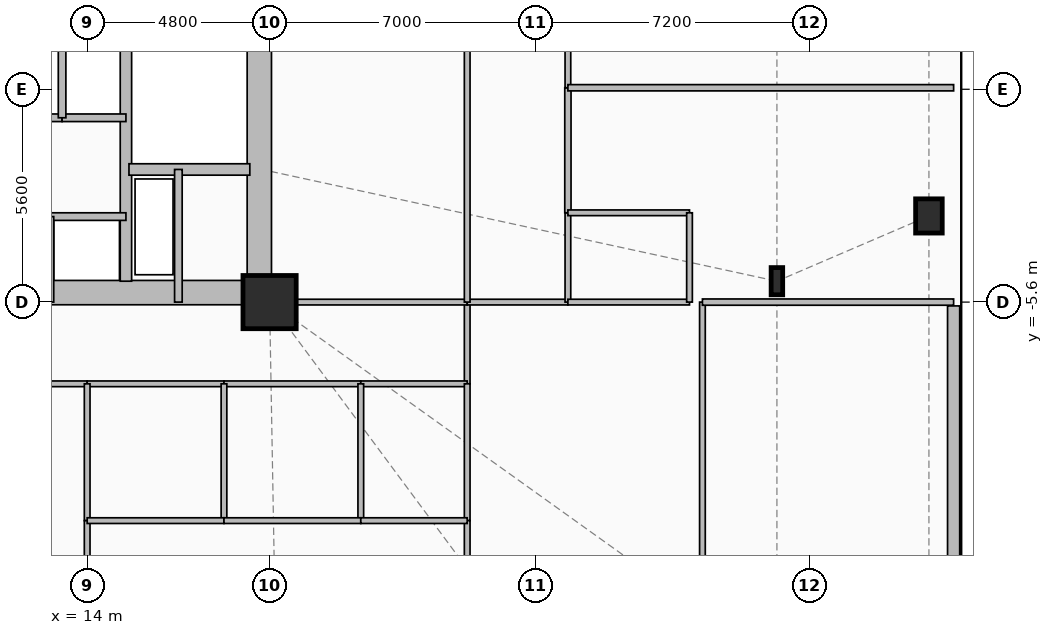
"""IFC4 building model, lengths in metres.
Left out: names, types, materials, properties, quantities, classifications, styles, units other than length and angle.
Written with IfcOpenShell. Run it as: python <this file> out.ifc"""

import sys

from ifc_helpers import new_model, si_unit, direction, frame, frame_2d, origin, origin_2d, place, context, subcontext, project, spatial, rectangle, i_section, extrude, element, fill, save


model = new_model("IFC4")
c1 = context("Model", 3, precision=1e-05, world=origin(), true_north=direction((0.0, 1.0)))
c2 = subcontext(c1, "Body", "Model", "MODEL_VIEW")
j1 = project(units=[si_unit("LENGTHUNIT", "METRE"), si_unit("PLANEANGLEUNIT", "RADIAN")], contexts=[c1])
p1 = place(None, origin())
s1 = spatial("IfcSite", under=j1, at=p1, CompositionType="ELEMENT")
p2 = place(p1, origin())
s2 = spatial("IfcBuilding", under=s1, at=p2, CompositionType="ELEMENT")
p3 = place(p2, frame((0.0, 0.0, 22.5)))
s3 = spatial("IfcBuildingStorey", under=s2, at=p3, CompositionType="ELEMENT", Elevation=22.5)
p4 = place(p3, frame((18.8, -5.6, 0.0), z_axis=(0.0, 0.0, 1.0), x_axis=(1.0, 0.0, 0.0)))
e1 = element("IfcColumn", 1, at=p4, inside=s3, PredefinedType="COLUMN", context=c2, shape_type="SweptSolid", body=[
    extrude(rectangle(XDim=1.4, YDim=1.4, at=origin_2d()), origin(), (0.0, 0.0, 1.0), 4.5),
])
p5 = place(p3, frame((36.15, -3.333, 0.0), z_axis=(0.0, 0.0, 1.0), x_axis=(1.0, 0.0, 0.0)))
e2 = element("IfcColumn", 2, at=p5, inside=s3, PredefinedType="COLUMN", context=c2, shape_type="SweptSolid", body=[
    extrude(rectangle(XDim=0.7, YDim=0.9, at=origin_2d()), origin(), (0.0, 0.0, 1.0), 4.5),
])
p6 = place(p3, frame((32.15, -5.05, 0.0), z_axis=(0.0, 0.0, 1.0), x_axis=(1.0, 0.0, 0.0)))
e3 = element("IfcColumn", 3, at=p6, inside=s3, PredefinedType="COLUMN", context=c2, shape_type="SweptSolid", body=[
    extrude(i_section(OverallWidth=0.304, OverallDepth=0.716, WebThickness=0.021, FlangeThickness=0.04, FilletRadius=0.027, at=origin_2d()), origin(), (0.0, 0.0, 1.0), 4.5),
])
p7 = place(p3, frame((36.8, -5.7, 0.0), z_axis=(0.0, 0.0, 1.0), x_axis=(0.0, -1.0, 0.0)))
e4 = element("IfcWall", 4, at=p7, inside=s3, PredefinedType="SOLIDWALL", context=c2, shape_type="SweptSolid", body=[
    extrude(rectangle(XDim=16.1, YDim=0.32, at=frame_2d((8.05, 0.0))), origin(), (0.0, 0.0, 1.0), 4.16),
])
p8 = place(p7, frame((8.485, 0.0, 0.85)))
e5 = element("IfcOpeningElement", 5, at=p8, cuts=e4, PredefinedType="OPENING", context=c2, shape_type="SweptSolid", body=[
    extrude(rectangle(XDim=2.6, YDim=2.4, at=frame_2d((1.3, 1.2))), frame((0.0, 0.17, 0.0), z_axis=(0.0, -1.0, 0.0), x_axis=(1.0, 0.0, 0.0)), (0.0, 0.0, 1.0), 0.34),
])
p9 = place(p3, frame((9.2, -5.35, 0.0), z_axis=(0.0, 0.0, 1.0), x_axis=(1.0, 0.0, 0.0)))
e6 = element("IfcWall", 6, at=p9, inside=s3, PredefinedType="SHEAR", context=c2, shape_type="SweptSolid", body=[
    extrude(rectangle(XDim=9.6, YDim=0.64, at=frame_2d((4.8, 0.0))), origin(), (0.0, 0.0, 1.0), 4.16),
])
p10 = place(p9, frame((7.65, 0.0, 0.0)))
e7 = element("IfcOpeningElement", 7, at=p10, cuts=e6, PredefinedType="OPENING", context=c2, shape_type="SweptSolid", body=[
    extrude(rectangle(XDim=0.9, YDim=2.1, at=frame_2d((0.45, 1.05))), frame((0.0, 0.33, 0.0), z_axis=(0.0, -1.0, 0.0), x_axis=(1.0, 0.0, 0.0)), (0.0, 0.0, 1.0), 0.66),
])
p11 = place(p3, frame((18.53, -5.05, 0.0), z_axis=(0.0, 0.0, 1.0), x_axis=(0.0, 1.0, 0.0)))
e8 = element("IfcWall", 8, at=p11, inside=s3, PredefinedType="SHEAR", context=c2, shape_type="SweptSolid", body=[
    extrude(rectangle(XDim=10.1, YDim=0.64, at=frame_2d((5.05, 0.0))), origin(), (0.0, 0.0, 1.0), 4.16),
])
p12 = place(p3, frame((15.02, -5.05, 0.0), z_axis=(0.0, 0.0, 1.0), x_axis=(0.0, 1.0, 0.0)))
e9 = element("IfcWall", 9, at=p12, inside=s3, PredefinedType="SHEAR", context=c2, shape_type="SweptSolid", body=[
    extrude(rectangle(XDim=10.1, YDim=0.3, at=frame_2d((5.05, 0.0))), origin(), (0.0, 0.0, 1.0), 4.16),
])
p13 = place(p3, frame((15.1, -2.11, 0.0), z_axis=(0.0, 0.0, 1.0), x_axis=(1.0, 0.0, 0.0)))
e10 = element("IfcWall", 10, at=p13, inside=s3, PredefinedType="SHEAR", context=c2, shape_type="SweptSolid", body=[
    extrude(rectangle(XDim=3.18, YDim=0.3, at=frame_2d((1.59, 0.0))), origin(), (0.0, 0.0, 1.0), 4.16),
])
p14 = place(p3, frame((16.4, -2.11, 0.0), z_axis=(0.0, 0.0, 1.0), x_axis=(0.0, -1.0, 0.0)))
e11 = element("IfcWall", 11, at=p14, inside=s3, PredefinedType="PARTITIONING", context=c2, shape_type="SweptSolid", body=[
    extrude(rectangle(XDim=3.49, YDim=0.2, at=frame_2d((1.745, 0.0))), origin(), (0.0, 0.0, 1.0), 4.16),
])
p15 = place(p3, frame((13.02, -3.35, 0.0), z_axis=(0.0, 0.0, 1.0), x_axis=(1.0, 0.0, 0.0)))
e12 = element("IfcWall", 12, at=p15, inside=s3, PredefinedType="PARTITIONING", context=c2, shape_type="SweptSolid", body=[
    extrude(rectangle(XDim=2.0, YDim=0.2, at=frame_2d((1.0, 0.0))), origin(), (0.0, 0.0, 1.0), 4.16),
])
p16 = place(p3, frame((13.34, -0.75, 0.0), z_axis=(0.0, 0.0, 1.0), x_axis=(-1.0, 0.0, 0.0)))
e13 = element("IfcWall", 13, at=p16, inside=s3, PredefinedType="PARTITIONING", context=c2, shape_type="SweptSolid", body=[
    extrude(rectangle(XDim=1.88, YDim=0.2, at=frame_2d((0.94, 0.0))), origin(), (0.0, 0.0, 1.0), 4.16),
])
p17 = place(p16, frame((0.415, 0.0, 0.0)))
e14 = element("IfcOpeningElement", 14, at=p17, cuts=e13, PredefinedType="OPENING", context=c2, shape_type="SweptSolid", body=[
    extrude(rectangle(XDim=1.05, YDim=2.1, at=frame_2d((0.525, 1.05))), frame((0.0, 0.11, 0.0), z_axis=(0.0, -1.0, 0.0), x_axis=(1.0, 0.0, 0.0)), (0.0, 0.0, 1.0), 0.22),
])
p18 = place(p3, frame((15.02, -0.75, 0.0), z_axis=(0.0, 0.0, 1.0), x_axis=(-1.0, 0.0, 0.0)))
e15 = element("IfcWall", 15, at=p18, inside=s3, PredefinedType="PARTITIONING", context=c2, shape_type="SweptSolid", body=[
    extrude(rectangle(XDim=1.68, YDim=0.2, at=frame_2d((0.84, 0.0))), origin(), (0.0, 0.0, 1.0), 4.16),
])
p19 = place(p3, frame((13.02, -5.6, 0.0), z_axis=(0.0, 0.0, 1.0), x_axis=(0.0, 1.0, 0.0)))
e16 = element("IfcWall", 16, at=p19, inside=s3, PredefinedType="PARTITIONING", context=c2, shape_type="SweptSolid", body=[
    extrude(rectangle(XDim=2.25, YDim=0.2, at=frame_2d((1.125, 0.0))), origin(), (0.0, 0.0, 1.0), 4.16),
])
p20 = place(p3, frame((13.34, -0.75, 0.0), z_axis=(0.0, 0.0, 1.0), x_axis=(0.0, 1.0, 0.0)))
e17 = element("IfcWall", 17, at=p20, inside=s3, PredefinedType="PARTITIONING", context=c2, shape_type="SweptSolid", body=[
    extrude(rectangle(XDim=2.3, YDim=0.2, at=frame_2d((1.15, 0.0))), origin(), (0.0, 0.0, 1.0), 4.16),
])
p21 = place(p3, frame((24.0, -5.6, 0.0), z_axis=(0.0, 0.0, 1.0), x_axis=(0.0, -1.0, 0.0)))
e18 = element("IfcWall", 18, at=p21, inside=s3, PredefinedType="PARTITIONING", context=c2, shape_type="SweptSolid", body=[
    extrude(rectangle(XDim=2.15, YDim=0.15, at=frame_2d((1.075, 0.0))), origin(), (0.0, 0.0, 1.0), 4.16),
])
p22 = place(p21, frame((0.625, 0.0, 0.0)))
e19 = element("IfcOpeningElement", 19, at=p22, cuts=e18, PredefinedType="OPENING", context=c2, shape_type="SweptSolid", body=[
    extrude(rectangle(XDim=0.9, YDim=2.1, at=frame_2d((0.45, 1.05))), frame((0.0, 0.085, 0.0), z_axis=(0.0, -1.0, 0.0), x_axis=(1.0, 0.0, 0.0)), (0.0, 0.0, 1.0), 0.17),
])
p23 = place(p3, frame((18.8, -5.6, 0.0), z_axis=(0.0, 0.0, 1.0), x_axis=(1.0, 0.0, 0.0)))
e20 = element("IfcWall", 20, at=p23, inside=s3, PredefinedType="PARTITIONING", context=c2, shape_type="SweptSolid", body=[
    extrude(rectangle(XDim=5.2, YDim=0.15, at=frame_2d((2.6, 0.0))), origin(), (0.0, 0.0, 1.0), 4.16),
])
p24 = place(p3, frame((14.0, -7.75, 0.0), z_axis=(0.0, 0.0, 1.0), x_axis=(-1.0, 0.0, 0.0)))
e21 = element("IfcWall", 21, at=p24, inside=s3, PredefinedType="PARTITIONING", context=c2, shape_type="SweptSolid", body=[
    extrude(rectangle(XDim=14.0, YDim=0.15, at=frame_2d((7.0, 0.0))), origin(), (0.0, 0.0, 1.0), 4.16),
])
p25 = place(p24, frame((10.59, 0.0, 0.0)))
e22 = element("IfcOpeningElement", 22, at=p25, cuts=e21, PredefinedType="OPENING", context=c2, shape_type="SweptSolid", body=[
    extrude(rectangle(XDim=1.4, YDim=2.3, at=frame_2d((0.7, 1.15))), frame((0.0, 0.085, 0.0), z_axis=(0.0, -1.0, 0.0), x_axis=(1.0, 0.0, 0.0)), (0.0, 0.0, 1.0), 0.17),
])
p26 = place(p3, frame((17.6, -7.75, 0.0), z_axis=(0.0, 0.0, 1.0), x_axis=(-1.0, 0.0, 0.0)))
e23 = element("IfcWall", 23, at=p26, inside=s3, PredefinedType="PLUMBINGWALL", context=c2, shape_type="SweptSolid", body=[
    extrude(rectangle(XDim=3.6, YDim=0.15, at=frame_2d((1.8, 0.0))), origin(), (0.0, 0.0, 1.0), 4.16),
])
p27 = place(p26, frame((1.927, 0.0, 0.0)))
e24 = element("IfcOpeningElement", 24, at=p27, cuts=e23, PredefinedType="OPENING", context=c2, shape_type="SweptSolid", body=[
    extrude(rectangle(XDim=0.9, YDim=2.1, at=frame_2d((0.45, 1.05))), frame((0.0, 0.085, 0.0), z_axis=(0.0, -1.0, 0.0), x_axis=(1.0, 0.0, 0.0)), (0.0, 0.0, 1.0), 0.17),
])
p28 = place(p3, frame((21.2, -7.75, 0.0), z_axis=(0.0, 0.0, 1.0), x_axis=(-1.0, 0.0, 0.0)))
e25 = element("IfcWall", 25, at=p28, inside=s3, PredefinedType="PLUMBINGWALL", context=c2, shape_type="SweptSolid", body=[
    extrude(rectangle(XDim=3.6, YDim=0.15, at=frame_2d((1.8, 0.0))), origin(), (0.0, 0.0, 1.0), 4.16),
])
p29 = place(p28, frame((0.772, 0.0, 0.0)))
e26 = element("IfcOpeningElement", 26, at=p29, cuts=e25, PredefinedType="OPENING", context=c2, shape_type="SweptSolid", body=[
    extrude(rectangle(XDim=0.9, YDim=2.1, at=frame_2d((0.45, 1.05))), frame((0.0, 0.085, 0.0), z_axis=(0.0, -1.0, 0.0), x_axis=(1.0, 0.0, 0.0)), (0.0, 0.0, 1.0), 0.17),
])
p30 = place(p3, frame((24.0, -7.75, 0.0), z_axis=(0.0, 0.0, 1.0), x_axis=(-1.0, 0.0, 0.0)))
e27 = element("IfcWall", 27, at=p30, inside=s3, PredefinedType="PARTITIONING", context=c2, shape_type="SweptSolid", body=[
    extrude(rectangle(XDim=2.8, YDim=0.15, at=frame_2d((1.4, 0.0))), origin(), (0.0, 0.0, 1.0), 4.16),
])
p31 = place(p30, frame((0.666, 0.0, 0.0)))
e28 = element("IfcOpeningElement", 28, at=p31, cuts=e27, PredefinedType="OPENING", context=c2, shape_type="SweptSolid", body=[
    extrude(rectangle(XDim=0.95, YDim=2.1, at=frame_2d((0.475, 1.05))), frame((0.0, 0.085, 0.0), z_axis=(0.0, -1.0, 0.0), x_axis=(1.0, 0.0, 0.0)), (0.0, 0.0, 1.0), 0.17),
])
p32 = place(p3, frame((26.65, -5.6, 0.0), z_axis=(0.0, 0.0, 1.0), x_axis=(-1.0, 0.0, 0.0)))
e29 = element("IfcWall", 29, at=p32, inside=s3, PredefinedType="PARTITIONING", context=c2, shape_type="SweptSolid", body=[
    extrude(rectangle(XDim=2.65, YDim=0.15, at=frame_2d((1.325, 0.0))), origin(), (0.0, 0.0, 1.0), 4.16),
])
p33 = place(p32, frame((0.635, 0.0, 0.0)))
e30 = element("IfcOpeningElement", 30, at=p33, cuts=e29, PredefinedType="OPENING", context=c2, shape_type="SweptSolid", body=[
    extrude(rectangle(XDim=1.05, YDim=2.15, at=frame_2d((0.525, 1.075))), frame((0.0, 0.085, 0.0), z_axis=(0.0, -1.0, 0.0), x_axis=(1.0, 0.0, 0.0)), (0.0, 0.0, 1.0), 0.17),
])
p34 = place(p3, frame((26.65, -3.25, 0.0), z_axis=(0.0, 0.0, 1.0), x_axis=(0.0, -1.0, 0.0)))
e31 = element("IfcWall", 31, at=p34, inside=s3, PredefinedType="PLUMBINGWALL", context=c2, shape_type="SweptSolid", body=[
    extrude(rectangle(XDim=2.35, YDim=0.15, at=frame_2d((1.175, 0.0))), origin(), (0.0, 0.0, 1.0), 4.16),
])
p35 = place(p34, frame((0.616, 0.0, 0.0)))
e32 = element("IfcOpeningElement", 32, at=p35, cuts=e31, PredefinedType="OPENING", context=c2, shape_type="SweptSolid", body=[
    extrude(rectangle(XDim=0.9, YDim=2.1, at=frame_2d((0.45, 1.05))), frame((0.0, 0.085, 0.0), z_axis=(0.0, -1.0, 0.0), x_axis=(1.0, 0.0, 0.0)), (0.0, 0.0, 1.0), 0.17),
])
p36 = place(p3, frame((26.65, 0.04, 0.0), z_axis=(0.0, 0.0, 1.0), x_axis=(0.0, -1.0, 0.0)))
e33 = element("IfcWall", 33, at=p36, inside=s3, PredefinedType="PARTITIONING", context=c2, shape_type="SweptSolid", body=[
    extrude(rectangle(XDim=3.29, YDim=0.165, at=frame_2d((1.645, 0.0))), origin(), (0.0, 0.0, 1.0), 4.16),
])
p37 = place(p36, frame((0.702, 0.0, 0.0)))
e34 = element("IfcOpeningElement", 34, at=p37, cuts=e33, PredefinedType="OPENING", context=c2, shape_type="SweptSolid", body=[
    extrude(rectangle(XDim=1.15, YDim=2.15, at=frame_2d((0.575, 1.075))), frame((0.0, 0.093, 0.0), z_axis=(0.0, -1.0, 0.0), x_axis=(1.0, 0.0, 0.0)), (0.0, 0.0, 1.0), 0.185),
])
p38 = place(p3, frame((26.65, 2.155, 0.0), z_axis=(0.0, 0.0, 1.0), x_axis=(0.0, -1.0, 0.0)))
e35 = element("IfcWall", 35, at=p38, inside=s3, PredefinedType="PARTITIONING", context=c2, shape_type="SweptSolid", body=[
    extrude(rectangle(XDim=2.115, YDim=0.15, at=frame_2d((1.058, 0.0))), origin(), (0.0, 0.0, 1.0), 4.16),
])
p39 = place(p38, frame((0.583, 0.0, 0.0)))
e36 = element("IfcOpeningElement", 36, at=p39, cuts=e35, PredefinedType="OPENING", context=c2, shape_type="SweptSolid", body=[
    extrude(rectangle(XDim=0.95, YDim=2.1, at=frame_2d((0.475, 1.05))), frame((0.0, 0.085, 0.0), z_axis=(0.0, -1.0, 0.0), x_axis=(1.0, 0.0, 0.0)), (0.0, 0.0, 1.0), 0.17),
])
p40 = place(p3, frame((24.0, -5.6, 0.0), z_axis=(0.0, 0.0, 1.0), x_axis=(0.0, 1.0, 0.0)))
e37 = element("IfcWall", 37, at=p40, inside=s3, PredefinedType="PARTITIONING", context=c2, shape_type="SweptSolid", body=[
    extrude(rectangle(XDim=14.1, YDim=0.15, at=frame_2d((7.05, 0.0))), origin(), (0.0, 0.0, 1.0), 4.16),
])
p41 = place(p3, frame((30.19, -5.6, 0.0), z_axis=(0.0, 0.0, 1.0), x_axis=(0.0, -1.0, 0.0)))
e38 = element("IfcWall", 38, at=p41, inside=s3, PredefinedType="PARTITIONING", context=c2, shape_type="SweptSolid", body=[
    extrude(rectangle(XDim=16.2, YDim=0.15, at=frame_2d((8.1, 0.0))), origin(), (0.0, 0.0, 1.0), 4.16),
])
p42 = place(p41, frame((4.077, 0.0, 0.0)))
e39 = element("IfcOpeningElement", 39, at=p42, cuts=e38, PredefinedType="OPENING", context=c2, shape_type="SweptSolid", body=[
    extrude(rectangle(XDim=1.05, YDim=2.15, at=frame_2d((0.525, 1.075))), frame((0.0, 0.085, 0.0), z_axis=(0.0, -1.0, 0.0), x_axis=(1.0, 0.0, 0.0)), (0.0, 0.0, 1.0), 0.17),
])
p43 = place(p3, frame((26.65, -5.6, 0.0), z_axis=(0.0, 0.0, 1.0), x_axis=(1.0, 0.0, 0.0)))
e40 = element("IfcWall", 40, at=p43, inside=s3, PredefinedType="PLUMBINGWALL", context=c2, shape_type="SweptSolid", body=[
    extrude(rectangle(XDim=3.2, YDim=0.15, at=frame_2d((1.6, 0.0))), origin(), (0.0, 0.0, 1.0), 4.16),
])
p44 = place(p3, frame((24.0, -11.35, 0.0), z_axis=(0.0, 0.0, 1.0), x_axis=(0.0, 1.0, 0.0)))
e41 = element("IfcWall", 41, at=p44, inside=s3, PredefinedType="PARTITIONING", context=c2, shape_type="SweptSolid", body=[
    extrude(rectangle(XDim=3.6, YDim=0.15, at=frame_2d((1.8, 0.0))), origin(), (0.0, 0.0, 1.0), 4.16),
])
p45 = place(p3, frame((24.0, -21.8, 0.0), z_axis=(0.0, 0.0, 1.0), x_axis=(0.0, 1.0, 0.0)))
e42 = element("IfcWall", 42, at=p45, inside=s3, PredefinedType="PARTITIONING", context=c2, shape_type="SweptSolid", body=[
    extrude(rectangle(XDim=10.45, YDim=0.15, at=frame_2d((5.225, 0.0))), origin(), (0.0, 0.0, 1.0), 4.16),
])
p46 = place(p3, frame((30.19, -5.6, 0.0), z_axis=(0.0, 0.0, 1.0), x_axis=(1.0, 0.0, 0.0)))
e43 = element("IfcWall", 43, at=p46, inside=s3, PredefinedType="PARTITIONING", context=c2, shape_type="SweptSolid", body=[
    extrude(rectangle(XDim=6.61, YDim=0.165, at=frame_2d((3.305, 0.0))), origin(), (0.0, 0.0, 1.0), 4.16),
])
p47 = place(p3, frame((26.65, -3.25, 0.0), z_axis=(0.0, 0.0, 1.0), x_axis=(1.0, 0.0, 0.0)))
e44 = element("IfcWall", 44, at=p47, inside=s3, PredefinedType="PLUMBINGWALL", context=c2, shape_type="SweptSolid", body=[
    extrude(rectangle(XDim=3.2, YDim=0.15, at=frame_2d((1.6, 0.0))), origin(), (0.0, 0.0, 1.0), 4.16),
])
p48 = place(p3, frame((29.85, -3.25, 0.0), z_axis=(0.0, 0.0, 1.0), x_axis=(0.0, -1.0, 0.0)))
e45 = element("IfcWall", 45, at=p48, inside=s3, PredefinedType="PLUMBINGWALL", context=c2, shape_type="SweptSolid", body=[
    extrude(rectangle(XDim=2.35, YDim=0.15, at=frame_2d((1.175, 0.0))), origin(), (0.0, 0.0, 1.0), 4.16),
])
p49 = place(p3, frame((26.65, 0.04, 0.0), z_axis=(0.0, 0.0, 1.0), x_axis=(1.0, 0.0, 0.0)))
e46 = element("IfcWall", 46, at=p49, inside=s3, PredefinedType="PARTITIONING", context=c2, shape_type="SweptSolid", body=[
    extrude(rectangle(XDim=10.15, YDim=0.165, at=frame_2d((5.075, 0.0))), origin(), (0.0, 0.0, 1.0), 4.16),
])
p50 = place(p3, frame((14.0, -7.75, 0.0), z_axis=(0.0, 0.0, 1.0), x_axis=(0.0, -1.0, 0.0)))
e47 = element("IfcWall", 47, at=p50, inside=s3, PredefinedType="PLUMBINGWALL", context=c2, shape_type="SweptSolid", body=[
    extrude(rectangle(XDim=3.6, YDim=0.15, at=frame_2d((1.8, 0.0))), origin(), (0.0, 0.0, 1.0), 4.16),
])
p51 = place(p3, frame((14.0, -11.35, 0.0), z_axis=(0.0, 0.0, 1.0), x_axis=(0.0, -1.0, 0.0)))
e48 = element("IfcWall", 48, at=p51, inside=s3, PredefinedType="PARTITIONING", context=c2, shape_type="SweptSolid", body=[
    extrude(rectangle(XDim=10.45, YDim=0.15, at=frame_2d((5.225, 0.0))), origin(), (0.0, 0.0, 1.0), 4.16),
])
for number, where, z_axis, x_axis in (
    (49, (17.6, -7.75, 0.0), (0.0, 0.0, 1.0), (0.0, -1.0, 0.0)),
    (50, (17.6, -11.35, 0.0), (0.0, 0.0, 1.0), (-1.0, 0.0, 0.0)),
    (51, (21.2, -7.75, 0.0), (0.0, 0.0, 1.0), (0.0, -1.0, 0.0)),
):
    element("IfcWall", number, at=place(p3, frame(where, z_axis=z_axis, x_axis=x_axis)), inside=s3, PredefinedType="PLUMBINGWALL", context=c2, shape_type="SweptSolid", body=[
        extrude(rectangle(XDim=3.6, YDim=0.15, at=frame_2d((1.8, 0.0))), origin(), (0.0, 0.0, 1.0), 4.16),
    ])
p52 = place(p3, frame((21.2, -11.35, 0.0), z_axis=(0.0, 0.0, 1.0), x_axis=(-1.0, 0.0, 0.0)))
e52 = element("IfcWall", 52, at=p52, inside=s3, PredefinedType="PLUMBINGWALL", context=c2, shape_type="SweptSolid", body=[
    extrude(rectangle(XDim=3.6, YDim=0.15, at=frame_2d((1.8, 0.0))), origin(), (0.0, 0.0, 1.0), 4.16),
])
p53 = place(p3, frame((24.0, -11.35, 0.0), z_axis=(0.0, 0.0, 1.0), x_axis=(-1.0, 0.0, 0.0)))
e53 = element("IfcWall", 53, at=p53, inside=s3, PredefinedType="PARTITIONING", context=c2, shape_type="SweptSolid", body=[
    extrude(rectangle(XDim=2.8, YDim=0.15, at=frame_2d((1.4, 0.0))), origin(), (0.0, 0.0, 1.0), 4.16),
])
p54 = place(p53, frame((0.666, 0.0, 0.0)))
e54 = element("IfcOpeningElement", 54, at=p54, cuts=e53, PredefinedType="OPENING", context=c2, shape_type="SweptSolid", body=[
    extrude(rectangle(XDim=0.95, YDim=2.1, at=frame_2d((0.475, 1.05))), frame((0.0, 0.085, 0.0), z_axis=(0.0, -1.0, 0.0), x_axis=(1.0, 0.0, 0.0)), (0.0, 0.0, 1.0), 0.17),
])
p55 = place(p10, origin())
e55 = element("IfcDoor", 55, at=p55, inside=s3, OperationType="SINGLE_SWING_RIGHT", PredefinedType="DOOR", context=c2, shape_type="SweptSolid", body=[
    extrude(rectangle(XDim=0.9, YDim=2.1, at=frame_2d((0.45, 1.05))), frame((0.0, 0.025, 0.0), z_axis=(0.0, -1.0, 0.0), x_axis=(1.0, 0.0, 0.0)), (0.0, 0.0, 1.0), 0.05),
])
fill(e7, e55)
p56 = place(p22, origin())
e56 = element("IfcDoor", 56, at=p56, inside=s3, OperationType="SINGLE_SWING_RIGHT", PredefinedType="DOOR", context=c2, shape_type="SweptSolid", body=[
    extrude(rectangle(XDim=0.9, YDim=2.1, at=frame_2d((0.45, 1.05))), frame((0.0, 0.025, 0.0), z_axis=(0.0, -1.0, 0.0), x_axis=(1.0, 0.0, 0.0)), (0.0, 0.0, 1.0), 0.05),
])
fill(e19, e56)
p57 = place(p27, origin())
e57 = element("IfcDoor", 57, at=p57, inside=s3, OperationType="SINGLE_SWING_RIGHT", PredefinedType="DOOR", context=c2, shape_type="SweptSolid", body=[
    extrude(rectangle(XDim=0.9, YDim=2.1, at=frame_2d((0.45, 1.05))), frame((0.0, 0.025, 0.0), z_axis=(0.0, -1.0, 0.0), x_axis=(1.0, 0.0, 0.0)), (0.0, 0.0, 1.0), 0.05),
])
fill(e24, e57)
p58 = place(p29, origin())
e58 = element("IfcDoor", 58, at=p58, inside=s3, OperationType="SINGLE_SWING_LEFT", PredefinedType="DOOR", context=c2, shape_type="SweptSolid", body=[
    extrude(rectangle(XDim=0.9, YDim=2.1, at=frame_2d((0.45, 1.05))), frame((0.0, 0.025, 0.0), z_axis=(0.0, -1.0, 0.0), x_axis=(1.0, 0.0, 0.0)), (0.0, 0.0, 1.0), 0.05),
])
fill(e26, e58)
p59 = place(p31, origin())
e59 = element("IfcDoor", 59, at=p59, inside=s3, OperationType="SINGLE_SWING_RIGHT", PredefinedType="DOOR", context=c2, shape_type="SweptSolid", body=[
    extrude(rectangle(XDim=0.95, YDim=2.1, at=frame_2d((0.475, 1.05))), frame((0.0, 0.025, 0.0), z_axis=(0.0, -1.0, 0.0), x_axis=(1.0, 0.0, 0.0)), (0.0, 0.0, 1.0), 0.05),
])
fill(e28, e59)
p60 = place(p33, origin())
e60 = element("IfcDoor", 60, at=p60, inside=s3, OperationType="SINGLE_SWING_LEFT", PredefinedType="DOOR", context=c2, shape_type="SweptSolid", body=[
    extrude(rectangle(XDim=1.05, YDim=2.15, at=frame_2d((0.525, 1.075))), frame((0.0, 0.025, 0.0), z_axis=(0.0, -1.0, 0.0), x_axis=(1.0, 0.0, 0.0)), (0.0, 0.0, 1.0), 0.05),
])
fill(e30, e60)
p61 = place(p35, origin())
e61 = element("IfcDoor", 61, at=p61, inside=s3, OperationType="SINGLE_SWING_RIGHT", PredefinedType="DOOR", context=c2, shape_type="SweptSolid", body=[
    extrude(rectangle(XDim=0.9, YDim=2.1, at=frame_2d((0.45, 1.05))), frame((0.0, 0.025, 0.0), z_axis=(0.0, -1.0, 0.0), x_axis=(1.0, 0.0, 0.0)), (0.0, 0.0, 1.0), 0.05),
])
fill(e32, e61)
p62 = place(p37, origin())
e62 = element("IfcDoor", 62, at=p62, inside=s3, OperationType="SINGLE_SWING_LEFT", PredefinedType="DOOR", context=c2, shape_type="SweptSolid", body=[
    extrude(rectangle(XDim=1.15, YDim=2.15, at=frame_2d((0.575, 1.075))), frame((0.0, 0.025, 0.0), z_axis=(0.0, -1.0, 0.0), x_axis=(1.0, 0.0, 0.0)), (0.0, 0.0, 1.0), 0.05),
])
fill(e34, e62)
p63 = place(p39, origin())
e63 = element("IfcDoor", 63, at=p63, inside=s3, OperationType="SINGLE_SWING_RIGHT", PredefinedType="DOOR", context=c2, shape_type="SweptSolid", body=[
    extrude(rectangle(XDim=0.95, YDim=2.1, at=frame_2d((0.475, 1.05))), frame((0.0, 0.025, 0.0), z_axis=(0.0, -1.0, 0.0), x_axis=(1.0, 0.0, 0.0)), (0.0, 0.0, 1.0), 0.05),
])
fill(e36, e63)
p64 = place(p42, origin())
e64 = element("IfcDoor", 64, at=p64, inside=s3, OperationType="SINGLE_SWING_LEFT", PredefinedType="DOOR", context=c2, shape_type="SweptSolid", body=[
    extrude(rectangle(XDim=1.05, YDim=2.15, at=frame_2d((0.525, 1.075))), frame((0.0, 0.025, 0.0), z_axis=(0.0, -1.0, 0.0), x_axis=(1.0, 0.0, 0.0)), (0.0, 0.0, 1.0), 0.05),
])
fill(e39, e64)
p65 = place(p54, origin())
e65 = element("IfcDoor", 65, at=p65, inside=s3, OperationType="SINGLE_SWING_LEFT", PredefinedType="DOOR", context=c2, shape_type="SweptSolid", body=[
    extrude(rectangle(XDim=0.95, YDim=2.1, at=frame_2d((0.475, 1.05))), frame((0.0, 0.025, 0.0), z_axis=(0.0, -1.0, 0.0), x_axis=(1.0, 0.0, 0.0)), (0.0, 0.0, 1.0), 0.05),
])
fill(e54, e65)
save(model, sys.argv[1])
